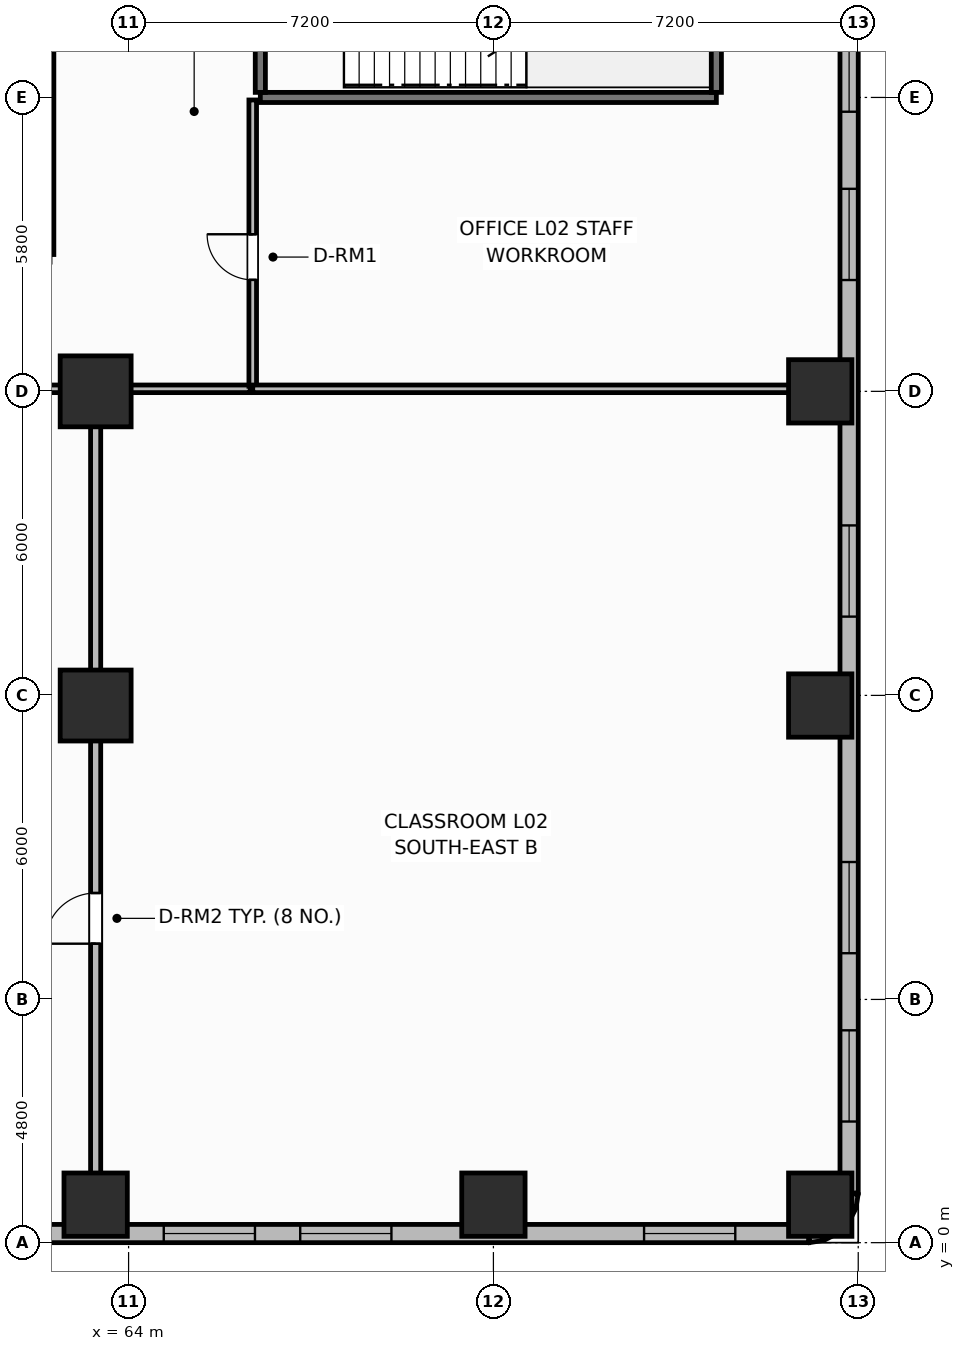
"""IFC4 building model, lengths in metres.
Left out: names, types, materials, properties, quantities, classifications, styles, units other than length and angle.
Written with IfcOpenShell. Run it as: python <this file> out.ifc"""

import sys

from ifc_helpers import new_model, si_unit, direction, frame, frame_2d, origin, origin_2d, place, context, subcontext, project, spatial, rectangle, extrude, element, fill, save


model = new_model("IFC4")
c1 = context("Model", 3, precision=1e-05, world=origin(), true_north=direction((0.0, 1.0)))
c2 = subcontext(c1, "Body", "Model", "MODEL_VIEW")
j1 = project(units=[si_unit("LENGTHUNIT", "METRE"), si_unit("PLANEANGLEUNIT", "RADIAN")], contexts=[c1])
p1 = place(None, origin())
s1 = spatial("IfcSite", under=j1, at=p1, CompositionType="ELEMENT")
p2 = place(p1, origin())
s2 = spatial("IfcBuilding", under=s1, at=p2, CompositionType="ELEMENT")
p3 = place(p2, frame((0.0, 0.0, 11.1)))
s3 = spatial("IfcBuildingStorey", under=s2, at=p3, CompositionType="ELEMENT", Elevation=11.1)
for number, where, z_axis, x_axis in (
    (1, (63.35, 0.75, 0.0), (0.0, 0.0, 1.0), (1.0, 0.0, 0.0)),
    (2, (71.2, 0.75, 0.0), (0.0, 0.0, 1.0), (1.0, 0.0, 0.0)),
    (3, (77.65, 0.75, 0.0), (0.0, 0.0, 1.0), (1.0, 0.0, 0.0)),
    (4, (77.65, 10.6, 0.0), (0.0, 0.0, 1.0), (1.0, 0.0, 0.0)),
    (5, (77.65, 16.8, 0.0), (0.0, 0.0, 1.0), (1.0, 0.0, 0.0)),
):
    element("IfcColumn", number, at=place(p3, frame(where, z_axis=z_axis, x_axis=x_axis)), inside=s3, PredefinedType="COLUMN", context=c2, shape_type="SweptSolid", body=[
        extrude(rectangle(XDim=1.25, YDim=1.25, at=origin_2d()), origin(), (0.0, 0.0, 1.0), 4.5),
    ])
for number, where, z_axis, x_axis in (
    (6, (63.35, 10.6, 0.0), (0.0, 0.0, 1.0), (1.0, 0.0, 0.0)),
    (7, (63.35, 16.8, 0.0), (0.0, 0.0, 1.0), (1.0, 0.0, 0.0)),
):
    element("IfcColumn", number, at=place(p3, frame(where, z_axis=z_axis, x_axis=x_axis)), inside=s3, PredefinedType="COLUMN", context=c2, shape_type="SweptSolid", body=[
        extrude(rectangle(XDim=1.4, YDim=1.4, at=origin_2d()), origin(), (0.0, 0.0, 1.0), 4.5),
    ])
p4 = place(p3, frame((21.83, 0.18, 0.0), z_axis=(0.0, 0.0, 1.0), x_axis=(1.0, 0.0, 0.0)))
e8 = element("IfcWall", 8, at=p4, inside=s3, PredefinedType="SOLIDWALL", context=c2, shape_type="SweptSolid", body=[
    extrude(rectangle(XDim=55.59, YDim=0.36, at=frame_2d((27.795, 0.0))), origin(), (0.0, 0.0, 1.0), 3.48),
])
p5 = place(p4, frame((0.747, 0.0, 0.9)))
e9 = element("IfcOpeningElement", 9, at=p5, cuts=e8, PredefinedType="OPENING", context=c2, shape_type="SweptSolid", body=[
    extrude(rectangle(XDim=1.8, YDim=2.1, at=frame_2d((0.9, 1.05))), frame((0.0, 0.19, 0.0), z_axis=(0.0, -1.0, 0.0), x_axis=(1.0, 0.0, 0.0)), (0.0, 0.0, 1.0), 0.38),
])
p6 = place(p4, frame((5.19, 0.0, 0.9)))
e10 = element("IfcOpeningElement", 10, at=p6, cuts=e8, PredefinedType="OPENING", context=c2, shape_type="SweptSolid", body=[
    extrude(rectangle(XDim=1.8, YDim=2.1, at=frame_2d((0.9, 1.05))), frame((0.0, 0.19, 0.0), z_axis=(0.0, -1.0, 0.0), x_axis=(1.0, 0.0, 0.0)), (0.0, 0.0, 1.0), 0.38),
])
p7 = place(p4, frame((8.233, 0.0, 0.9)))
e11 = element("IfcOpeningElement", 11, at=p7, cuts=e8, PredefinedType="OPENING", context=c2, shape_type="SweptSolid", body=[
    extrude(rectangle(XDim=1.8, YDim=2.1, at=frame_2d((0.9, 1.05))), frame((0.0, 0.19, 0.0), z_axis=(0.0, -1.0, 0.0), x_axis=(1.0, 0.0, 0.0)), (0.0, 0.0, 1.0), 0.38),
])
p8 = place(p4, frame((11.626, 0.0, 0.9)))
e12 = element("IfcOpeningElement", 12, at=p8, cuts=e8, PredefinedType="OPENING", context=c2, shape_type="SweptSolid", body=[
    extrude(rectangle(XDim=1.8, YDim=2.1, at=frame_2d((0.9, 1.05))), frame((0.0, 0.19, 0.0), z_axis=(0.0, -1.0, 0.0), x_axis=(1.0, 0.0, 0.0)), (0.0, 0.0, 1.0), 0.38),
])
p9 = place(p4, frame((14.319, 0.0, 0.9)))
e13 = element("IfcOpeningElement", 13, at=p9, cuts=e8, PredefinedType="OPENING", context=c2, shape_type="SweptSolid", body=[
    extrude(rectangle(XDim=1.8, YDim=2.1, at=frame_2d((0.9, 1.05))), frame((0.0, 0.19, 0.0), z_axis=(0.0, -1.0, 0.0), x_axis=(1.0, 0.0, 0.0)), (0.0, 0.0, 1.0), 0.38),
])
p10 = place(p4, frame((18.762, 0.0, 0.9)))
e14 = element("IfcOpeningElement", 14, at=p10, cuts=e8, PredefinedType="OPENING", context=c2, shape_type="SweptSolid", body=[
    extrude(rectangle(XDim=1.8, YDim=2.1, at=frame_2d((0.9, 1.05))), frame((0.0, 0.19, 0.0), z_axis=(0.0, -1.0, 0.0), x_axis=(1.0, 0.0, 0.0)), (0.0, 0.0, 1.0), 0.38),
])
p11 = place(p4, frame((21.805, 0.0, 0.9)))
e15 = element("IfcOpeningElement", 15, at=p11, cuts=e8, PredefinedType="OPENING", context=c2, shape_type="SweptSolid", body=[
    extrude(rectangle(XDim=1.8, YDim=2.1, at=frame_2d((0.9, 1.05))), frame((0.0, 0.19, 0.0), z_axis=(0.0, -1.0, 0.0), x_axis=(1.0, 0.0, 0.0)), (0.0, 0.0, 1.0), 0.38),
])
p12 = place(p4, frame((25.198, 0.0, 0.9)))
e16 = element("IfcOpeningElement", 16, at=p12, cuts=e8, PredefinedType="OPENING", context=c2, shape_type="SweptSolid", body=[
    extrude(rectangle(XDim=1.8, YDim=2.1, at=frame_2d((0.9, 1.05))), frame((0.0, 0.19, 0.0), z_axis=(0.0, -1.0, 0.0), x_axis=(1.0, 0.0, 0.0)), (0.0, 0.0, 1.0), 0.38),
])
p13 = place(p4, frame((27.892, 0.0, 0.9)))
e17 = element("IfcOpeningElement", 17, at=p13, cuts=e8, PredefinedType="OPENING", context=c2, shape_type="SweptSolid", body=[
    extrude(rectangle(XDim=1.8, YDim=2.1, at=frame_2d((0.9, 1.05))), frame((0.0, 0.19, 0.0), z_axis=(0.0, -1.0, 0.0), x_axis=(1.0, 0.0, 0.0)), (0.0, 0.0, 1.0), 0.38),
])
p14 = place(p4, frame((32.335, 0.0, 0.9)))
e18 = element("IfcOpeningElement", 18, at=p14, cuts=e8, PredefinedType="OPENING", context=c2, shape_type="SweptSolid", body=[
    extrude(rectangle(XDim=1.8, YDim=2.1, at=frame_2d((0.9, 1.05))), frame((0.0, 0.19, 0.0), z_axis=(0.0, -1.0, 0.0), x_axis=(1.0, 0.0, 0.0)), (0.0, 0.0, 1.0), 0.38),
])
p15 = place(p4, frame((35.378, 0.0, 0.9)))
e19 = element("IfcOpeningElement", 19, at=p15, cuts=e8, PredefinedType="OPENING", context=c2, shape_type="SweptSolid", body=[
    extrude(rectangle(XDim=1.8, YDim=2.1, at=frame_2d((0.9, 1.05))), frame((0.0, 0.19, 0.0), z_axis=(0.0, -1.0, 0.0), x_axis=(1.0, 0.0, 0.0)), (0.0, 0.0, 1.0), 0.38),
])
p16 = place(p4, frame((38.421, 0.0, 0.9)))
e20 = element("IfcOpeningElement", 20, at=p16, cuts=e8, PredefinedType="OPENING", context=c2, shape_type="SweptSolid", body=[
    extrude(rectangle(XDim=1.8, YDim=2.1, at=frame_2d((0.9, 1.05))), frame((0.0, 0.19, 0.0), z_axis=(0.0, -1.0, 0.0), x_axis=(1.0, 0.0, 0.0)), (0.0, 0.0, 1.0), 0.38),
])
p17 = place(p4, frame((42.864, 0.0, 0.9)))
e21 = element("IfcOpeningElement", 21, at=p17, cuts=e8, PredefinedType="OPENING", context=c2, shape_type="SweptSolid", body=[
    extrude(rectangle(XDim=1.8, YDim=2.1, at=frame_2d((0.9, 1.05))), frame((0.0, 0.19, 0.0), z_axis=(0.0, -1.0, 0.0), x_axis=(1.0, 0.0, 0.0)), (0.0, 0.0, 1.0), 0.38),
])
p18 = place(p4, frame((45.557, 0.0, 0.9)))
e22 = element("IfcOpeningElement", 22, at=p18, cuts=e8, PredefinedType="OPENING", context=c2, shape_type="SweptSolid", body=[
    extrude(rectangle(XDim=1.8, YDim=2.1, at=frame_2d((0.9, 1.05))), frame((0.0, 0.19, 0.0), z_axis=(0.0, -1.0, 0.0), x_axis=(1.0, 0.0, 0.0)), (0.0, 0.0, 1.0), 0.38),
])
p19 = place(p4, frame((52.344, 0.0, 0.9)))
e23 = element("IfcOpeningElement", 23, at=p19, cuts=e8, PredefinedType="OPENING", context=c2, shape_type="SweptSolid", body=[
    extrude(rectangle(XDim=1.8, YDim=2.1, at=frame_2d((0.9, 1.05))), frame((0.0, 0.19, 0.0), z_axis=(0.0, -1.0, 0.0), x_axis=(1.0, 0.0, 0.0)), (0.0, 0.0, 1.0), 0.38),
])
p20 = place(p3, frame((77.42, 0.18, 0.0), z_axis=(0.0, 0.0, 1.0), x_axis=(0.987604361038, 0.156963773077, 0.0)))
e24 = element("IfcWall", 24, at=p20, inside=s3, PredefinedType="SOLIDWALL", context=c2, shape_type="SweptSolid", body=[
    extrude(rectangle(XDim=0.25, YDim=0.36, at=frame_2d((0.125, 0.0))), origin(), (0.0, 0.0, 1.0), 3.48),
])
for number, where, z_axis, x_axis in (
    (25, (77.667, 0.219, 0.0), (0.0, 0.0, 1.0), (0.891, 0.454, 0.0)),
    (26, (77.89, 0.333, 0.0), (0.0, 0.0, 1.0), (0.707, 0.707, 0.0)),
):
    element("IfcWall", number, at=place(p3, frame(where, z_axis=z_axis, x_axis=x_axis)), inside=s3, PredefinedType="SOLIDWALL", context=c2, shape_type="SweptSolid", body=[
        extrude(rectangle(XDim=0.25, YDim=0.36, at=frame_2d((0.125, 0.0))), origin(), (0.0, 0.0, 1.0), 3.48),
    ])
p21 = place(p3, frame((78.067, 0.51, 0.0), z_axis=(0.0, 0.0, 1.0), x_axis=(0.454217786225, 0.89089067942, 0.0)))
e27 = element("IfcWall", 27, at=p21, inside=s3, PredefinedType="SOLIDWALL", context=c2, shape_type="SweptSolid", body=[
    extrude(rectangle(XDim=0.25, YDim=0.36, at=frame_2d((0.125, 0.0))), origin(), (0.0, 0.0, 1.0), 3.48),
])
p22 = place(p3, frame((78.181, 0.733, 0.0), z_axis=(0.0, 0.0, 1.0), x_axis=(0.156163049852, 0.987731290312, 0.0)))
e28 = element("IfcWall", 28, at=p22, inside=s3, PredefinedType="SOLIDWALL", context=c2, shape_type="SweptSolid", body=[
    extrude(rectangle(XDim=0.25, YDim=0.36, at=frame_2d((0.125, 0.0))), origin(), (0.0, 0.0, 1.0), 3.48),
])
p23 = place(p3, frame((78.22, 0.98, 0.0), z_axis=(0.0, 0.0, 1.0), x_axis=(0.0, 1.0, 0.0)))
e29 = element("IfcWall", 29, at=p23, inside=s3, PredefinedType="SOLIDWALL", context=c2, shape_type="SweptSolid", body=[
    extrude(rectangle(XDim=54.44, YDim=0.36, at=frame_2d((27.22, 0.0))), origin(), (0.0, 0.0, 1.0), 3.48),
])
p24 = place(p23, frame((1.411, 0.0, 0.9)))
e30 = element("IfcOpeningElement", 30, at=p24, cuts=e29, PredefinedType="OPENING", context=c2, shape_type="SweptSolid", body=[
    extrude(rectangle(XDim=1.8, YDim=2.1, at=frame_2d((0.9, 1.05))), frame((0.0, 0.19, 0.0), z_axis=(0.0, -1.0, 0.0), x_axis=(1.0, 0.0, 0.0)), (0.0, 0.0, 1.0), 0.38),
])
p25 = place(p23, frame((4.732, 0.0, 0.9)))
e31 = element("IfcOpeningElement", 31, at=p25, cuts=e29, PredefinedType="OPENING", context=c2, shape_type="SweptSolid", body=[
    extrude(rectangle(XDim=1.8, YDim=2.1, at=frame_2d((0.9, 1.05))), frame((0.0, 0.19, 0.0), z_axis=(0.0, -1.0, 0.0), x_axis=(1.0, 0.0, 0.0)), (0.0, 0.0, 1.0), 0.38),
])
p26 = place(p23, frame((11.375, 0.0, 0.9)))
e32 = element("IfcOpeningElement", 32, at=p26, cuts=e29, PredefinedType="OPENING", context=c2, shape_type="SweptSolid", body=[
    extrude(rectangle(XDim=1.8, YDim=2.1, at=frame_2d((0.9, 1.05))), frame((0.0, 0.19, 0.0), z_axis=(0.0, -1.0, 0.0), x_axis=(1.0, 0.0, 0.0)), (0.0, 0.0, 1.0), 0.38),
])
p27 = place(p23, frame((18.017, 0.0, 0.9)))
e33 = element("IfcOpeningElement", 33, at=p27, cuts=e29, PredefinedType="OPENING", context=c2, shape_type="SweptSolid", body=[
    extrude(rectangle(XDim=1.8, YDim=2.1, at=frame_2d((0.9, 1.05))), frame((0.0, 0.19, 0.0), z_axis=(0.0, -1.0, 0.0), x_axis=(1.0, 0.0, 0.0)), (0.0, 0.0, 1.0), 0.38),
])
p28 = place(p23, frame((21.338, 0.0, 0.9)))
e34 = element("IfcOpeningElement", 34, at=p28, cuts=e29, PredefinedType="OPENING", context=c2, shape_type="SweptSolid", body=[
    extrude(rectangle(XDim=1.8, YDim=2.1, at=frame_2d((0.9, 1.05))), frame((0.0, 0.19, 0.0), z_axis=(0.0, -1.0, 0.0), x_axis=(1.0, 0.0, 0.0)), (0.0, 0.0, 1.0), 0.38),
])
p29 = place(p23, frame((23.959, 0.0, 0.9)))
e35 = element("IfcOpeningElement", 35, at=p29, cuts=e29, PredefinedType="OPENING", context=c2, shape_type="SweptSolid", body=[
    extrude(rectangle(XDim=1.8, YDim=2.1, at=frame_2d((0.9, 1.05))), frame((0.0, 0.19, 0.0), z_axis=(0.0, -1.0, 0.0), x_axis=(1.0, 0.0, 0.0)), (0.0, 0.0, 1.0), 0.38),
])
p30 = place(p23, frame((28.681, 0.0, 0.9)))
e36 = element("IfcOpeningElement", 36, at=p30, cuts=e29, PredefinedType="OPENING", context=c2, shape_type="SweptSolid", body=[
    extrude(rectangle(XDim=1.8, YDim=2.1, at=frame_2d((0.9, 1.05))), frame((0.0, 0.19, 0.0), z_axis=(0.0, -1.0, 0.0), x_axis=(1.0, 0.0, 0.0)), (0.0, 0.0, 1.0), 0.38),
])
p31 = place(p23, frame((31.302, 0.0, 0.9)))
e37 = element("IfcOpeningElement", 37, at=p31, cuts=e29, PredefinedType="OPENING", context=c2, shape_type="SweptSolid", body=[
    extrude(rectangle(XDim=1.8, YDim=2.1, at=frame_2d((0.9, 1.05))), frame((0.0, 0.19, 0.0), z_axis=(0.0, -1.0, 0.0), x_axis=(1.0, 0.0, 0.0)), (0.0, 0.0, 1.0), 0.38),
])
p32 = place(p23, frame((34.623, 0.0, 0.9)))
e38 = element("IfcOpeningElement", 38, at=p32, cuts=e29, PredefinedType="OPENING", context=c2, shape_type="SweptSolid", body=[
    extrude(rectangle(XDim=1.8, YDim=2.1, at=frame_2d((0.9, 1.05))), frame((0.0, 0.19, 0.0), z_axis=(0.0, -1.0, 0.0), x_axis=(1.0, 0.0, 0.0)), (0.0, 0.0, 1.0), 0.38),
])
p33 = place(p23, frame((41.266, 0.0, 0.9)))
e39 = element("IfcOpeningElement", 39, at=p33, cuts=e29, PredefinedType="OPENING", context=c2, shape_type="SweptSolid", body=[
    extrude(rectangle(XDim=1.8, YDim=2.1, at=frame_2d((0.9, 1.05))), frame((0.0, 0.19, 0.0), z_axis=(0.0, -1.0, 0.0), x_axis=(1.0, 0.0, 0.0)), (0.0, 0.0, 1.0), 0.38),
])
p34 = place(p23, frame((47.908, 0.0, 0.9)))
e40 = element("IfcOpeningElement", 40, at=p34, cuts=e29, PredefinedType="OPENING", context=c2, shape_type="SweptSolid", body=[
    extrude(rectangle(XDim=1.8, YDim=2.1, at=frame_2d((0.9, 1.05))), frame((0.0, 0.19, 0.0), z_axis=(0.0, -1.0, 0.0), x_axis=(1.0, 0.0, 0.0)), (0.0, 0.0, 1.0), 0.38),
])
p35 = place(p23, frame((51.229, 0.0, 0.9)))
e41 = element("IfcOpeningElement", 41, at=p35, cuts=e29, PredefinedType="OPENING", context=c2, shape_type="SweptSolid", body=[
    extrude(rectangle(XDim=1.8, YDim=2.1, at=frame_2d((0.9, 1.05))), frame((0.0, 0.19, 0.0), z_axis=(0.0, -1.0, 0.0), x_axis=(1.0, 0.0, 0.0)), (0.0, 0.0, 1.0), 0.38),
])
p36 = place(p3, frame((66.6, 22.6, 0.0), z_axis=(0.0, 0.0, 1.0), x_axis=(1.0, 0.0, 0.0)))
e42 = element("IfcWall", 42, at=p36, inside=s3, PredefinedType="SHEAR", context=c2, shape_type="SweptSolid", body=[
    extrude(rectangle(XDim=9.0, YDim=0.2, at=frame_2d((4.5, 0.0))), origin(), (0.0, 0.0, 1.0), 4.5),
])
for number, where, z_axis, x_axis in (
    (43, (66.6, 22.7, 0.0), (0.0, 0.0, 1.0), (0.0, 1.0, 0.0)),
    (44, (75.6, 22.7, 0.0), (0.0, 0.0, 1.0), (0.0, 1.0, 0.0)),
):
    element("IfcWall", number, at=place(p3, frame(where, z_axis=z_axis, x_axis=x_axis)), inside=s3, PredefinedType="SHEAR", context=c2, shape_type="SweptSolid", body=[
        extrude(rectangle(XDim=3.4, YDim=0.2, at=frame_2d((1.7, 0.0))), origin(), (0.0, 0.0, 1.0), 4.5),
    ])
p37 = place(p3, frame((62.45, 19.5, 0.0), z_axis=(0.0, 0.0, 1.0), x_axis=(0.0, 1.0, 0.0)))
e45 = element("IfcWall", 45, at=p37, inside=s3, PredefinedType="PARTITIONING", context=c2, shape_type="SweptSolid", body=[
    extrude(rectangle(XDim=17.4, YDim=0.15, at=frame_2d((8.7, 0.0))), origin(), (0.0, 0.0, 1.0), 3.42),
])
p38 = place(p3, frame((63.35, 0.4, 0.0), z_axis=(0.0, 0.0, 1.0), x_axis=(0.0, 1.0, 0.0)))
e46 = element("IfcWall", 46, at=p38, inside=s3, PredefinedType="PARTITIONING", context=c2, shape_type="SweptSolid", body=[
    extrude(rectangle(XDim=16.4, YDim=0.2, at=frame_2d((8.2, 0.0))), origin(), (0.0, 0.0, 1.0), 3.42),
])
p39 = place(p38, frame((5.5, 0.0, 0.0)))
e47 = element("IfcOpeningElement", 47, at=p39, cuts=e46, PredefinedType="OPENING", context=c2, shape_type="SweptSolid", body=[
    extrude(rectangle(XDim=1.0, YDim=2.15, at=frame_2d((0.5, 1.075))), frame((0.0, 0.11, 0.0), z_axis=(0.0, -1.0, 0.0), x_axis=(1.0, 0.0, 0.0)), (0.0, 0.0, 1.0), 0.22),
])
p40 = place(p3, frame((53.15, 16.85, 0.0), z_axis=(0.0, 0.0, 1.0), x_axis=(1.0, 0.0, 0.0)))
e48 = element("IfcWall", 48, at=p40, inside=s3, PredefinedType="PARTITIONING", context=c2, shape_type="SweptSolid", body=[
    extrude(rectangle(XDim=13.25, YDim=0.15, at=frame_2d((6.625, 0.0))), origin(), (0.0, 0.0, 1.0), 3.42),
])
p41 = place(p40, frame((4.2, 0.0, 0.0)))
e49 = element("IfcOpeningElement", 49, at=p41, cuts=e48, PredefinedType="OPENING", context=c2, shape_type="SweptSolid", body=[
    extrude(rectangle(XDim=1.0, YDim=2.15, at=frame_2d((0.5, 1.075))), frame((0.0, 0.085, 0.0), z_axis=(0.0, -1.0, 0.0), x_axis=(1.0, 0.0, 0.0)), (0.0, 0.0, 1.0), 0.17),
])
p42 = place(p3, frame((66.45, 16.9, 0.0), z_axis=(0.0, 0.0, 1.0), x_axis=(0.0, 1.0, 0.0)))
e50 = element("IfcWall", 50, at=p42, inside=s3, PredefinedType="PARTITIONING", context=c2, shape_type="SweptSolid", body=[
    extrude(rectangle(XDim=5.65, YDim=0.15, at=frame_2d((2.825, 0.0))), origin(), (0.0, 0.0, 1.0), 3.42),
])
p43 = place(p42, frame((2.1, 0.0, 0.0)))
e51 = element("IfcOpeningElement", 51, at=p43, cuts=e50, PredefinedType="OPENING", context=c2, shape_type="SweptSolid", body=[
    extrude(rectangle(XDim=0.9, YDim=2.1, at=frame_2d((0.45, 1.05))), frame((0.0, 0.085, 0.0), z_axis=(0.0, -1.0, 0.0), x_axis=(1.0, 0.0, 0.0)), (0.0, 0.0, 1.0), 0.17),
])
p44 = place(p3, frame((66.45, 16.85, 0.0), z_axis=(0.0, 0.0, 1.0), x_axis=(1.0, 0.0, 0.0)))
e52 = element("IfcWall", 52, at=p44, inside=s3, PredefinedType="PARTITIONING", context=c2, shape_type="SweptSolid", body=[
    extrude(rectangle(XDim=11.55, YDim=0.15, at=frame_2d((5.775, 0.0))), origin(), (0.0, 0.0, 1.0), 3.42),
])
p45 = place(p17, origin())
e53 = element("IfcWindow", 53, at=p45, inside=s3, PartitioningType="SINGLE_PANEL", PredefinedType="WINDOW", context=c2, shape_type="SweptSolid", body=[
    extrude(rectangle(XDim=1.8, YDim=2.1, at=frame_2d((0.9, 1.05))), frame((0.0, 0.03, 0.0), z_axis=(0.0, -1.0, 0.0), x_axis=(1.0, 0.0, 0.0)), (0.0, 0.0, 1.0), 0.06),
])
fill(e21, e53)
p46 = place(p18, origin())
e54 = element("IfcWindow", 54, at=p46, inside=s3, PartitioningType="SINGLE_PANEL", PredefinedType="WINDOW", context=c2, shape_type="SweptSolid", body=[
    extrude(rectangle(XDim=1.8, YDim=2.1, at=frame_2d((0.9, 1.05))), frame((0.0, 0.03, 0.0), z_axis=(0.0, -1.0, 0.0), x_axis=(1.0, 0.0, 0.0)), (0.0, 0.0, 1.0), 0.06),
])
fill(e22, e54)
p47 = place(p19, origin())
e55 = element("IfcWindow", 55, at=p47, inside=s3, PartitioningType="SINGLE_PANEL", PredefinedType="WINDOW", context=c2, shape_type="SweptSolid", body=[
    extrude(rectangle(XDim=1.8, YDim=2.1, at=frame_2d((0.9, 1.05))), frame((0.0, 0.03, 0.0), z_axis=(0.0, -1.0, 0.0), x_axis=(1.0, 0.0, 0.0)), (0.0, 0.0, 1.0), 0.06),
])
fill(e23, e55)
p48 = place(p24, origin())
e56 = element("IfcWindow", 56, at=p48, inside=s3, PartitioningType="SINGLE_PANEL", PredefinedType="WINDOW", context=c2, shape_type="SweptSolid", body=[
    extrude(rectangle(XDim=1.8, YDim=2.1, at=frame_2d((0.9, 1.05))), frame((0.0, 0.03, 0.0), z_axis=(0.0, -1.0, 0.0), x_axis=(1.0, 0.0, 0.0)), (0.0, 0.0, 1.0), 0.06),
])
fill(e30, e56)
p49 = place(p25, origin())
e57 = element("IfcWindow", 57, at=p49, inside=s3, PartitioningType="SINGLE_PANEL", PredefinedType="WINDOW", context=c2, shape_type="SweptSolid", body=[
    extrude(rectangle(XDim=1.8, YDim=2.1, at=frame_2d((0.9, 1.05))), frame((0.0, 0.03, 0.0), z_axis=(0.0, -1.0, 0.0), x_axis=(1.0, 0.0, 0.0)), (0.0, 0.0, 1.0), 0.06),
])
fill(e31, e57)
p50 = place(p26, origin())
e58 = element("IfcWindow", 58, at=p50, inside=s3, PartitioningType="SINGLE_PANEL", PredefinedType="WINDOW", context=c2, shape_type="SweptSolid", body=[
    extrude(rectangle(XDim=1.8, YDim=2.1, at=frame_2d((0.9, 1.05))), frame((0.0, 0.03, 0.0), z_axis=(0.0, -1.0, 0.0), x_axis=(1.0, 0.0, 0.0)), (0.0, 0.0, 1.0), 0.06),
])
fill(e32, e58)
p51 = place(p27, origin())
e59 = element("IfcWindow", 59, at=p51, inside=s3, PartitioningType="SINGLE_PANEL", PredefinedType="WINDOW", context=c2, shape_type="SweptSolid", body=[
    extrude(rectangle(XDim=1.8, YDim=2.1, at=frame_2d((0.9, 1.05))), frame((0.0, 0.03, 0.0), z_axis=(0.0, -1.0, 0.0), x_axis=(1.0, 0.0, 0.0)), (0.0, 0.0, 1.0), 0.06),
])
fill(e33, e59)
p52 = place(p28, origin())
e60 = element("IfcWindow", 60, at=p52, inside=s3, PartitioningType="SINGLE_PANEL", PredefinedType="WINDOW", context=c2, shape_type="SweptSolid", body=[
    extrude(rectangle(XDim=1.8, YDim=2.1, at=frame_2d((0.9, 1.05))), frame((0.0, 0.03, 0.0), z_axis=(0.0, -1.0, 0.0), x_axis=(1.0, 0.0, 0.0)), (0.0, 0.0, 1.0), 0.06),
])
fill(e34, e60)
p53 = place(p39, origin())
e61 = element("IfcDoor", 61, at=p53, inside=s3, OperationType="SINGLE_SWING_LEFT", PredefinedType="DOOR", context=c2, shape_type="SweptSolid", body=[
    extrude(rectangle(XDim=1.0, YDim=2.15, at=frame_2d((0.5, 1.075))), frame((0.0, 0.025, 0.0), z_axis=(0.0, -1.0, 0.0), x_axis=(1.0, 0.0, 0.0)), (0.0, 0.0, 1.0), 0.05),
])
fill(e47, e61)
p54 = place(p43, origin())
e62 = element("IfcDoor", 62, at=p54, inside=s3, OperationType="SINGLE_SWING_RIGHT", PredefinedType="DOOR", context=c2, shape_type="SweptSolid", body=[
    extrude(rectangle(XDim=0.9, YDim=2.1, at=frame_2d((0.45, 1.05))), frame((0.0, 0.025, 0.0), z_axis=(0.0, -1.0, 0.0), x_axis=(1.0, 0.0, 0.0)), (0.0, 0.0, 1.0), 0.05),
])
fill(e51, e62)
save(model, sys.argv[1])
